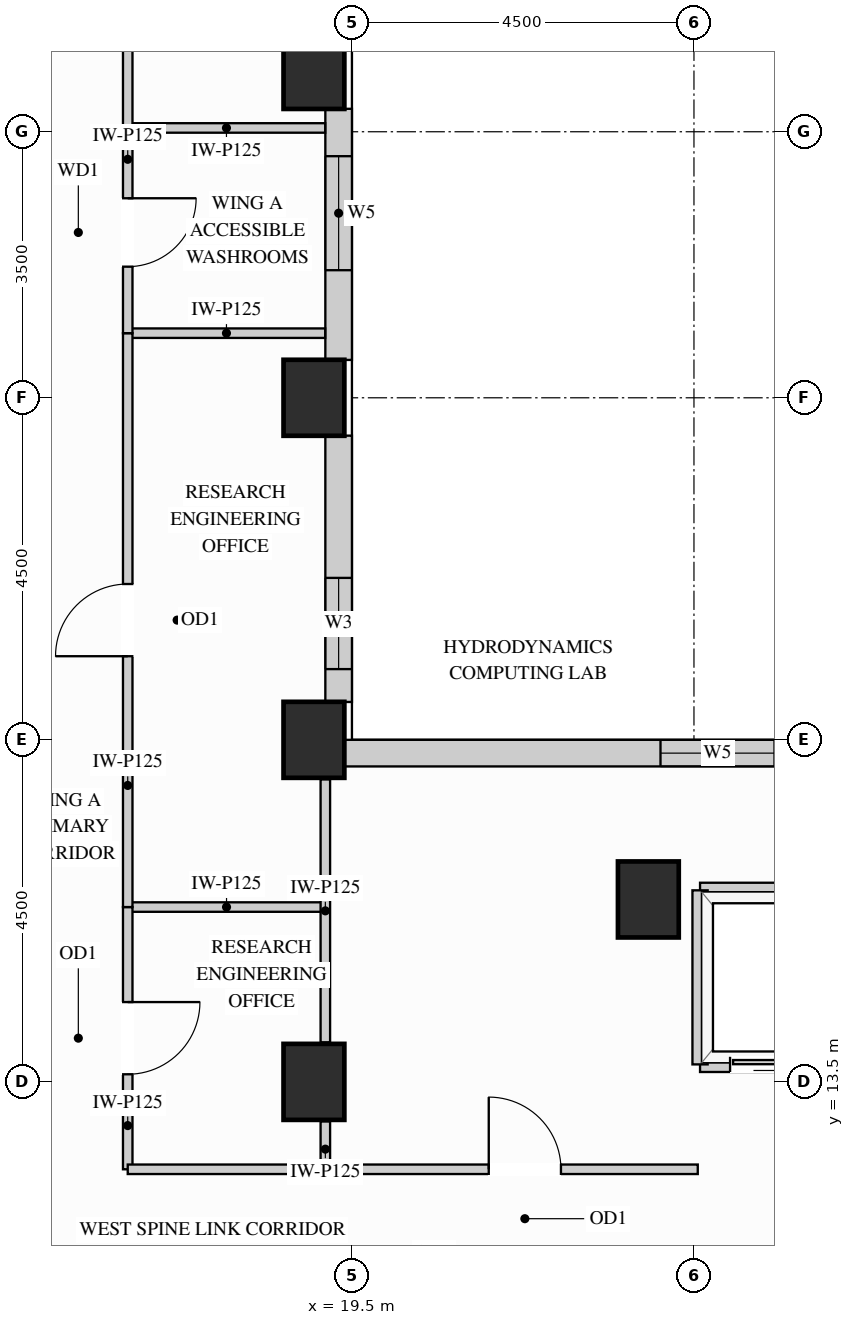
"""IFC4 building model, lengths in metres.
Left out: names, types, materials, properties, quantities, classifications, styles, units other than length and angle.
Written with IfcOpenShell. Run it as: python <this file> out.ifc"""

import sys

from ifc_helpers import new_model, si_unit, direction, frame, frame_2d, origin, origin_2d, place, context, subcontext, project, spatial, rectangle, extrude, source, transform, mapped, element, fill, save


model = new_model("IFC4")
c1 = context("Model", 3, precision=1e-05, world=origin(), true_north=direction((0.0, 1.0)))
c2 = subcontext(c1, "Body", "Model", "MODEL_VIEW")
j1 = project(units=[si_unit("LENGTHUNIT", "METRE"), si_unit("PLANEANGLEUNIT", "RADIAN")], contexts=[c1])
p1 = place(None, origin())
s1 = spatial("IfcSite", under=j1, at=p1, CompositionType="ELEMENT")
p2 = place(p1, origin())
s2 = spatial("IfcBuilding", under=s1, at=p2, CompositionType="ELEMENT")
p3 = place(p2, frame((0.0, 0.0, 161.1)))
s3 = spatial("IfcBuildingStorey", under=s2, at=p3, CompositionType="ELEMENT", Elevation=161.1)
m1 = source(origin(), c2, "Body", "SweptSolid", [
    extrude(rectangle(XDim=0.8, YDim=1.0, at=origin_2d()), origin(), (0.0, 0.0, 1.0), 3.4),
])
for number, where, z_axis, x_axis in (
    (1, (19.0, 13.5, 0.0), (0.0, 0.0, 1.0), (1.0, 0.0, 0.0)),
    (2, (19.0, 18.0, 0.0), (0.0, 0.0, 1.0), (1.0, 0.0, 0.0)),
    (3, (19.0, 22.5, 0.0), (0.0, 0.0, 1.0), (1.0, 0.0, 0.0)),
    (4, (19.0, 26.8, 0.0), (0.0, 0.0, 1.0), (1.0, 0.0, 0.0)),
    (5, (23.4, 15.9, 0.0), (0.0, 0.0, 1.0), (1.0, 0.0, 0.0)),
):
    element("IfcColumn", number, at=place(p3, frame(where, z_axis=z_axis, x_axis=x_axis)), inside=s3, PredefinedType="COLUMN", context=c2, shape_type="MappedRepresentation", body=[
        mapped(m1, transform((0.0, 0.0, 0.0), x_axis=(1.0, 0.0, 0.0), y_axis=(0.0, 1.0, 0.0), z_axis=(0.0, 0.0, 1.0))),
    ])
p4 = place(p3, frame((34.502, 17.825, 0.0), z_axis=(0.0, 0.0, 1.0), x_axis=(-1.0, 0.0, 0.0)))
e6 = element("IfcWall", 6, at=p4, inside=s3, PredefinedType="SOLIDWALL", context=c2, shape_type="SweptSolid", body=[
    extrude(rectangle(XDim=15.104, YDim=0.35, at=frame_2d((7.552, 0.0))), origin(), (0.0, 0.0, 1.0), 3.385),
])
p5 = place(p4, frame((4.131, 0.0, 0.78)))
e7 = element("IfcOpeningElement", 7, at=p5, cuts=e6, PredefinedType="OPENING", context=c2, shape_type="SweptSolid", body=[
    extrude(rectangle(XDim=1.5, YDim=2.0, at=frame_2d((0.75, 1.0))), frame((0.0, 0.185, 0.0), z_axis=(0.0, -1.0, 0.0), x_axis=(1.0, 0.0, 0.0)), (0.0, 0.0, 1.0), 0.37),
])
p6 = place(p4, frame((9.442, 0.0, 0.78)))
e8 = element("IfcOpeningElement", 8, at=p6, cuts=e6, PredefinedType="OPENING", context=c2, shape_type="SweptSolid", body=[
    extrude(rectangle(XDim=1.5, YDim=2.0, at=frame_2d((0.75, 1.0))), frame((0.0, 0.185, 0.0), z_axis=(0.0, -1.0, 0.0), x_axis=(1.0, 0.0, 0.0)), (0.0, 0.0, 1.0), 0.37),
])
p7 = place(p3, frame((19.325, 18.498, 0.0), z_axis=(0.0, 0.0, 1.0), x_axis=(0.0, 1.0, 0.0)))
e9 = element("IfcWall", 9, at=p7, inside=s3, PredefinedType="SOLIDWALL", context=c2, shape_type="SweptSolid", body=[
    extrude(rectangle(XDim=3.504, YDim=0.35, at=frame_2d((1.752, 0.0))), origin(), (0.0, 0.0, 1.0), 2.612),
])
p8 = place(p7, frame((0.433, 0.0, 0.78)))
e10 = element("IfcOpeningElement", 10, at=p8, cuts=e9, PredefinedType="OPENING", context=c2, shape_type="SweptSolid", body=[
    extrude(rectangle(XDim=1.2, YDim=1.652, at=frame_2d((0.6, 0.826))), frame((0.0, 0.185, 0.0), z_axis=(0.0, -1.0, 0.0), x_axis=(1.0, 0.0, 0.0)), (0.0, 0.0, 1.0), 0.37),
])
p9 = place(p3, frame((19.325, 22.998, 0.0), z_axis=(0.0, 0.0, 1.0), x_axis=(0.0, 1.0, 0.0)))
e11 = element("IfcWall", 11, at=p9, inside=s3, PredefinedType="SOLIDWALL", context=c2, shape_type="SweptSolid", body=[
    extrude(rectangle(XDim=3.304, YDim=0.35, at=frame_2d((1.652, 0.0))), origin(), (0.0, 0.0, 1.0), 2.612),
])
p10 = place(p9, frame((1.18, 0.0, 0.78)))
e12 = element("IfcOpeningElement", 12, at=p10, cuts=e11, PredefinedType="OPENING", context=c2, shape_type="SweptSolid", body=[
    extrude(rectangle(XDim=1.5, YDim=1.652, at=frame_2d((0.75, 0.826))), frame((0.0, 0.185, 0.0), z_axis=(0.0, -1.0, 0.0), x_axis=(1.0, 0.0, 0.0)), (0.0, 0.0, 1.0), 0.37),
])
m2 = source(origin(), c2, "Body", "SweptSolid", [
    extrude(rectangle(XDim=2.6, YDim=0.125, at=frame_2d((1.3, 0.0))), origin(), (0.0, 0.0, 1.0), 3.385),
])
p11 = place(p3, frame((16.55, 15.8, 0.0), z_axis=(0.0, 0.0, 1.0), x_axis=(1.0, 0.0, 0.0)))
e13 = element("IfcWall", 13, at=p11, inside=s3, PredefinedType="PARTITIONING", context=c2, shape_type="MappedRepresentation", body=[
    mapped(m2, transform((0.0, 0.0, 0.0), x_axis=(1.0, 0.0, 0.0), y_axis=(0.0, 1.0, 0.0), z_axis=(0.0, 0.0, 1.0))),
])
m3 = source(origin(), c2, "Body", "SweptSolid", [
    extrude(rectangle(XDim=2.598, YDim=0.125, at=frame_2d((1.299, 0.0))), origin(), (0.0, 0.0, 1.0), 3.385),
])
for number, where, z_axis, x_axis in (
    (14, (16.55, 23.35, 0.0), (0.0, 0.0, 1.0), (1.0, 0.0, 0.0)),
    (15, (16.55, 26.05, 0.0), (0.0, 0.0, 1.0), (1.0, 0.0, 0.0)),
):
    element("IfcWall", number, at=place(p3, frame(where, z_axis=z_axis, x_axis=x_axis)), inside=s3, PredefinedType="PARTITIONING", context=c2, shape_type="MappedRepresentation", body=[
        mapped(m3, transform((0.0, 0.0, 0.0), x_axis=(1.0, 0.0, 0.0), y_axis=(0.0, 1.0, 0.0), z_axis=(0.0, 0.0, 1.0))),
    ])
m4 = source(origin(), c2, "Body", "SweptSolid", [
    extrude(rectangle(XDim=0.63, YDim=0.125, at=frame_2d((0.315, 0.0))), origin(), (0.0, 0.0, 1.0), 2.773),
])
p12 = place(p3, frame((19.15, 12.35, 0.0), z_axis=(0.0, 0.0, 1.0), x_axis=(0.0, 1.0, 0.0)))
e16 = element("IfcWall", 16, at=p12, inside=s3, PredefinedType="PARTITIONING", context=c2, shape_type="MappedRepresentation", body=[
    mapped(m4, transform((0.0, 0.0, 0.0), x_axis=(1.0, 0.0, 0.0), y_axis=(0.0, 1.0, 0.0), z_axis=(0.0, 0.0, 1.0))),
])
m5 = source(origin(), c2, "Body", "SweptSolid", [
    extrude(rectangle(XDim=3.46, YDim=0.125, at=frame_2d((1.73, 0.0))), origin(), (0.0, 0.0, 1.0), 2.773),
])
p13 = place(p3, frame((19.15, 14.02, 0.0), z_axis=(0.0, 0.0, 1.0), x_axis=(0.0, 1.0, 0.0)))
e17 = element("IfcWall", 17, at=p13, inside=s3, PredefinedType="PARTITIONING", context=c2, shape_type="MappedRepresentation", body=[
    mapped(m5, transform((0.0, 0.0, 0.0), x_axis=(1.0, 0.0, 0.0), y_axis=(0.0, 1.0, 0.0), z_axis=(0.0, 0.0, 1.0))),
])
p14 = place(p3, frame((16.55, 12.35, 0.0), z_axis=(0.0, 0.0, 1.0), x_axis=(0.0, 1.0, 0.0)))
e18 = element("IfcWall", 18, at=p14, inside=s3, PredefinedType="PARTITIONING", context=c2, shape_type="SweptSolid", body=[
    extrude(rectangle(XDim=3.45, YDim=0.125, at=frame_2d((1.725, 0.0))), origin(), (0.0, 0.0, 1.0), 3.385),
])
p15 = place(p14, frame((1.25, 0.0, 0.0)))
e19 = element("IfcOpeningElement", 19, at=p15, cuts=e18, PredefinedType="OPENING", context=c2, shape_type="SweptSolid", body=[
    extrude(rectangle(XDim=0.95, YDim=2.15, at=frame_2d((0.475, 1.075))), frame((0.0, 0.073, 0.0), z_axis=(0.0, -1.0, 0.0), x_axis=(1.0, 0.0, 0.0)), (0.0, 0.0, 1.0), 0.145),
])
p16 = place(p3, frame((16.55, 15.8, 0.0), z_axis=(0.0, 0.0, 1.0), x_axis=(0.0, 1.0, 0.0)))
e20 = element("IfcWall", 20, at=p16, inside=s3, PredefinedType="PARTITIONING", context=c2, shape_type="SweptSolid", body=[
    extrude(rectangle(XDim=7.55, YDim=0.125, at=frame_2d((3.775, 0.0))), origin(), (0.0, 0.0, 1.0), 3.385),
])
p17 = place(p16, frame((3.3, 0.0, 0.0)))
e21 = element("IfcOpeningElement", 21, at=p17, cuts=e20, PredefinedType="OPENING", context=c2, shape_type="SweptSolid", body=[
    extrude(rectangle(XDim=0.95, YDim=2.15, at=frame_2d((0.475, 1.075))), frame((0.0, 0.073, 0.0), z_axis=(0.0, -1.0, 0.0), x_axis=(1.0, 0.0, 0.0)), (0.0, 0.0, 1.0), 0.145),
])
p18 = place(p3, frame((16.55, 26.05, 0.0), z_axis=(0.0, 0.0, 1.0), x_axis=(0.0, 1.0, 0.0)))
e22 = element("IfcWall", 22, at=p18, inside=s3, PredefinedType="PARTITIONING", context=c2, shape_type="SweptSolid", body=[
    extrude(rectangle(XDim=6.3, YDim=0.125, at=frame_2d((3.15, 0.0))), origin(), (0.0, 0.0, 1.0), 3.385),
])
p19 = place(p18, frame((2.675, 0.0, 0.0)))
e23 = element("IfcOpeningElement", 23, at=p19, cuts=e22, PredefinedType="OPENING", context=c2, shape_type="SweptSolid", body=[
    extrude(rectangle(XDim=0.95, YDim=2.15, at=frame_2d((0.475, 1.075))), frame((0.0, 0.073, 0.0), z_axis=(0.0, -1.0, 0.0), x_axis=(1.0, 0.0, 0.0)), (0.0, 0.0, 1.0), 0.145),
])
p20 = place(p3, frame((16.55, 23.35, 0.0), z_axis=(0.0, 0.0, 1.0), x_axis=(0.0, 1.0, 0.0)))
e24 = element("IfcWall", 24, at=p20, inside=s3, PredefinedType="PARTITIONING", context=c2, shape_type="SweptSolid", body=[
    extrude(rectangle(XDim=2.7, YDim=0.125, at=frame_2d((1.35, 0.0))), origin(), (0.0, 0.0, 1.0), 3.385),
])
p21 = place(p20, frame((0.875, 0.0, 0.0)))
e25 = element("IfcOpeningElement", 25, at=p21, cuts=e24, PredefinedType="OPENING", context=c2, shape_type="SweptSolid", body=[
    extrude(rectangle(XDim=0.9, YDim=2.15, at=frame_2d((0.45, 1.075))), frame((0.0, 0.073, 0.0), z_axis=(0.0, -1.0, 0.0), x_axis=(1.0, 0.0, 0.0)), (0.0, 0.0, 1.0), 0.145),
])
m6 = source(origin(), c2, "Body", "SweptSolid", [
    extrude(rectangle(XDim=2.95, YDim=0.125, at=frame_2d((1.475, 0.0))), origin(), (0.0, 0.0, 1.0), 3.385),
])
p22 = place(p3, frame((16.55, 12.35, 0.0), z_axis=(0.0, 0.0, 1.0), x_axis=(1.0, 0.0, 0.0)))
e26 = element("IfcWall", 26, at=p22, inside=s3, PredefinedType="PARTITIONING", context=c2, shape_type="MappedRepresentation", body=[
    mapped(m6, transform((0.0, 0.0, 0.0), x_axis=(1.0, 0.0, 0.0), y_axis=(0.0, 1.0, 0.0), z_axis=(0.0, 0.0, 1.0))),
])
p23 = place(p3, frame((19.5, 12.35, 0.0), z_axis=(0.0, 0.0, 1.0), x_axis=(1.0, 0.0, 0.0)))
e27 = element("IfcWall", 27, at=p23, inside=s3, PredefinedType="PARTITIONING", context=c2, shape_type="SweptSolid", body=[
    extrude(rectangle(XDim=4.55, YDim=0.125, at=frame_2d((2.275, 0.0))), origin(), (0.0, 0.0, 1.0), 3.385),
])
p24 = place(p23, frame((1.8, 0.0, 0.0)))
e28 = element("IfcOpeningElement", 28, at=p24, cuts=e27, PredefinedType="OPENING", context=c2, shape_type="SweptSolid", body=[
    extrude(rectangle(XDim=0.95, YDim=2.15, at=frame_2d((0.475, 1.075))), frame((0.0, 0.073, 0.0), z_axis=(0.0, -1.0, 0.0), x_axis=(1.0, 0.0, 0.0)), (0.0, 0.0, 1.0), 0.145),
])
m7 = source(origin(), c2, "Body", "SweptSolid", [
    extrude(rectangle(XDim=1.89, YDim=0.2, at=frame_2d((0.945, 0.0))), origin(), (0.0, 0.0, 1.0), 2.773),
])
p25 = place(p3, frame((24.08, 16.02, 0.0), z_axis=(0.0, 0.0, 1.0), x_axis=(1.0, 0.0, 0.0)))
e29 = element("IfcWall", 29, at=p25, inside=s3, PredefinedType="PARTITIONING", context=c2, shape_type="MappedRepresentation", body=[
    mapped(m7, transform((0.0, 0.0, 0.0), x_axis=(1.0, 0.0, 0.0), y_axis=(0.0, 1.0, 0.0), z_axis=(0.0, 0.0, 1.0))),
])
p26 = place(p3, frame((24.08, 13.73, 0.0), z_axis=(0.0, 0.0, 1.0), x_axis=(1.0, 0.0, 0.0)))
e30 = element("IfcWall", 30, at=p26, inside=s3, PredefinedType="PARTITIONING", context=c2, shape_type="SweptSolid", body=[
    extrude(rectangle(XDim=1.89, YDim=0.2, at=frame_2d((0.945, 0.0))), origin(), (0.0, 0.0, 1.0), 2.466),
])
p27 = place(p26, frame((0.395, 0.0, 0.0)))
e31 = element("IfcOpeningElement", 31, at=p27, cuts=e30, PredefinedType="OPENING", context=c2, shape_type="SweptSolid", body=[
    extrude(rectangle(XDim=1.1, YDim=2.2, at=frame_2d((0.55, 1.1))), frame((0.0, 0.11, 0.0), z_axis=(0.0, -1.0, 0.0), x_axis=(1.0, 0.0, 0.0)), (0.0, 0.0, 1.0), 0.22),
])
m8 = source(origin(), c2, "Body", "SweptSolid", [
    extrude(rectangle(XDim=2.29, YDim=0.2, at=frame_2d((1.145, 0.0))), origin(), (0.0, 0.0, 1.0), 3.385),
])
p28 = place(p3, frame((24.08, 13.73, 0.0), z_axis=(0.0, 0.0, 1.0), x_axis=(0.0, 1.0, 0.0)))
e32 = element("IfcWall", 32, at=p28, inside=s3, PredefinedType="PARTITIONING", context=c2, shape_type="MappedRepresentation", body=[
    mapped(m8, transform((0.0, 0.0, 0.0), x_axis=(1.0, 0.0, 0.0), y_axis=(0.0, 1.0, 0.0), z_axis=(0.0, 0.0, 1.0))),
])
m9 = source(origin(), c2, "Body", "SweptSolid", [
    extrude(rectangle(XDim=1.1, YDim=2.2, at=frame_2d((0.55, 1.1))), frame((0.0, 0.025, 0.0), z_axis=(0.0, -1.0, 0.0), x_axis=(1.0, 0.0, 0.0)), (0.0, 0.0, 1.0), 0.05),
])
p29 = place(p27, origin())
e33 = element("IfcDoor", 33, at=p29, inside=s3, OperationType="SLIDING_TO_LEFT", PredefinedType="DOOR", context=c2, shape_type="MappedRepresentation", body=[
    mapped(m9, transform((0.0, 0.0, 0.0), x_axis=(1.0, 0.0, 0.0), y_axis=(0.0, 1.0, 0.0), z_axis=(0.0, 0.0, 1.0))),
])
fill(e31, e33)
m10 = source(origin(), c2, "Body", "SweptSolid", [
    extrude(rectangle(XDim=0.95, YDim=2.15, at=frame_2d((0.475, 1.075))), frame((0.0, 0.025, 0.0), z_axis=(0.0, -1.0, 0.0), x_axis=(1.0, 0.0, 0.0)), (0.0, 0.0, 1.0), 0.05),
])
p30 = place(p15, origin())
e34 = element("IfcDoor", 34, at=p30, inside=s3, OperationType="SINGLE_SWING_RIGHT", PredefinedType="DOOR", context=c2, shape_type="MappedRepresentation", body=[
    mapped(m10, transform((0.0, 0.0, 0.0), x_axis=(1.0, 0.0, 0.0), y_axis=(0.0, 1.0, 0.0), z_axis=(0.0, 0.0, 1.0))),
])
fill(e19, e34)
p31 = place(p17, origin())
e35 = element("IfcDoor", 35, at=p31, inside=s3, OperationType="SINGLE_SWING_LEFT", PredefinedType="DOOR", context=c2, shape_type="MappedRepresentation", body=[
    mapped(m10, transform((0.0, 0.0, 0.0), x_axis=(1.0, 0.0, 0.0), y_axis=(0.0, 1.0, 0.0), z_axis=(0.0, 0.0, 1.0))),
])
fill(e21, e35)
p32 = place(p24, origin())
e36 = element("IfcDoor", 36, at=p32, inside=s3, OperationType="SINGLE_SWING_LEFT", PredefinedType="DOOR", context=c2, shape_type="MappedRepresentation", body=[
    mapped(m10, transform((0.0, 0.0, 0.0), x_axis=(1.0, 0.0, 0.0), y_axis=(0.0, 1.0, 0.0), z_axis=(0.0, 0.0, 1.0))),
])
fill(e28, e36)
m11 = source(origin(), c2, "Body", "SweptSolid", [
    extrude(rectangle(XDim=0.9, YDim=2.15, at=frame_2d((0.45, 1.075))), frame((0.0, 0.025, 0.0), z_axis=(0.0, -1.0, 0.0), x_axis=(1.0, 0.0, 0.0)), (0.0, 0.0, 1.0), 0.05),
])
p33 = place(p21, origin())
e37 = element("IfcDoor", 37, at=p33, inside=s3, OperationType="SINGLE_SWING_RIGHT", PredefinedType="DOOR", context=c2, shape_type="MappedRepresentation", body=[
    mapped(m11, transform((0.0, 0.0, 0.0), x_axis=(1.0, 0.0, 0.0), y_axis=(0.0, 1.0, 0.0), z_axis=(0.0, 0.0, 1.0))),
])
fill(e25, e37)
m12 = source(origin(), c2, "Body", "SweptSolid", [
    extrude(rectangle(XDim=1.2, YDim=1.652, at=frame_2d((0.6, 0.826))), frame((0.0, 0.03, 0.0), z_axis=(0.0, -1.0, 0.0), x_axis=(1.0, 0.0, 0.0)), (0.0, 0.0, 1.0), 0.06),
])
p34 = place(p8, origin())
e38 = element("IfcWindow", 38, at=p34, inside=s3, PartitioningType="SINGLE_PANEL", PredefinedType="WINDOW", context=c2, shape_type="MappedRepresentation", body=[
    mapped(m12, transform((0.0, 0.0, 0.0), x_axis=(1.0, 0.0, 0.0), y_axis=(0.0, 1.0, 0.0), z_axis=(0.0, 0.0, 1.0))),
])
fill(e10, e38)
m13 = source(origin(), c2, "Body", "SweptSolid", [
    extrude(rectangle(XDim=1.5, YDim=2.0, at=frame_2d((0.75, 1.0))), frame((0.0, 0.03, 0.0), z_axis=(0.0, -1.0, 0.0), x_axis=(1.0, 0.0, 0.0)), (0.0, 0.0, 1.0), 0.06),
])
p35 = place(p6, origin())
e39 = element("IfcWindow", 39, at=p35, inside=s3, PartitioningType="SINGLE_PANEL", PredefinedType="WINDOW", context=c2, shape_type="MappedRepresentation", body=[
    mapped(m13, transform((0.0, 0.0, 0.0), x_axis=(1.0, 0.0, 0.0), y_axis=(0.0, 1.0, 0.0), z_axis=(0.0, 0.0, 1.0))),
])
fill(e8, e39)
m14 = source(origin(), c2, "Body", "SweptSolid", [
    extrude(rectangle(XDim=1.5, YDim=1.652, at=frame_2d((0.75, 0.826))), frame((0.0, 0.03, 0.0), z_axis=(0.0, -1.0, 0.0), x_axis=(1.0, 0.0, 0.0)), (0.0, 0.0, 1.0), 0.06),
])
p36 = place(p10, origin())
e40 = element("IfcWindow", 40, at=p36, inside=s3, PartitioningType="SINGLE_PANEL", PredefinedType="WINDOW", context=c2, shape_type="MappedRepresentation", body=[
    mapped(m14, transform((0.0, 0.0, 0.0), x_axis=(1.0, 0.0, 0.0), y_axis=(0.0, 1.0, 0.0), z_axis=(0.0, 0.0, 1.0))),
])
fill(e12, e40)
save(model, sys.argv[1])
